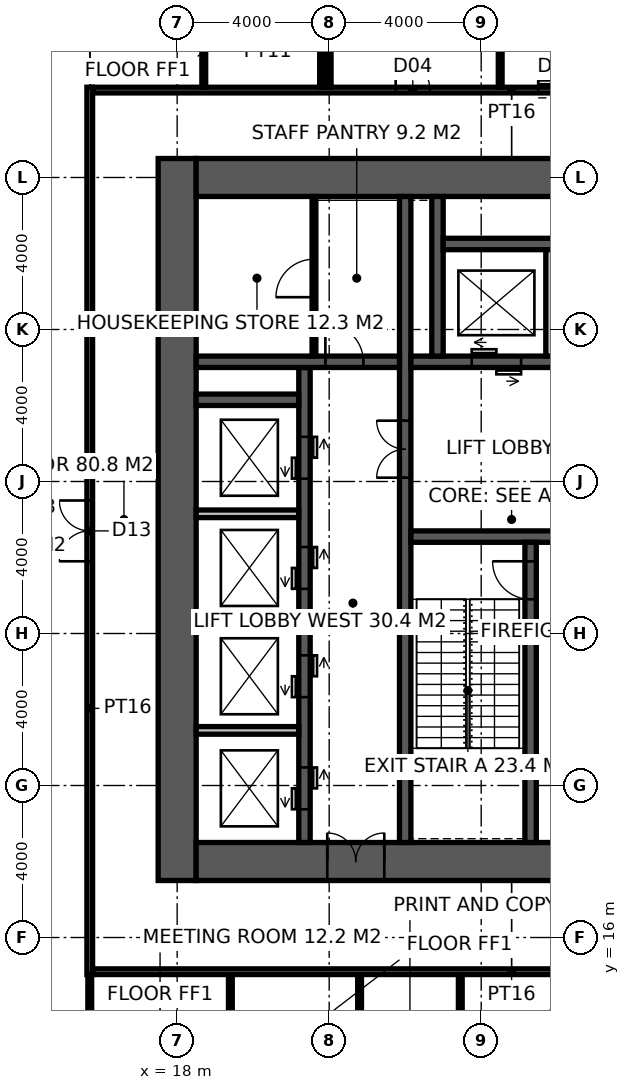
"""IFC4 building model, lengths in metres.
Left out: names, types, materials, properties, quantities, classifications, styles, units other than length and angle.
Written with IfcOpenShell. Run it as: python <this file> out.ifc"""

import sys

from ifc_helpers import new_model, si_unit, direction, frame, frame_2d, origin, place, context, subcontext, project, spatial, rectangle, extrude, element, fill, save


model = new_model("IFC4")
c1 = context("Model", 3, precision=1e-05, world=origin(), true_north=direction((0.0, 1.0)))
c2 = subcontext(c1, "Body", "Model", "MODEL_VIEW")
j1 = project(units=[si_unit("LENGTHUNIT", "METRE"), si_unit("PLANEANGLEUNIT", "RADIAN")], contexts=[c1])
p1 = place(None, origin())
s1 = spatial("IfcSite", under=j1, at=p1, CompositionType="ELEMENT")
p2 = place(p1, origin())
s2 = spatial("IfcBuilding", under=s1, at=p2, CompositionType="ELEMENT")
p3 = place(p2, frame((0.0, 0.0, 209.2)))
s3 = spatial("IfcBuildingStorey", under=s2, at=p3, CompositionType="ELEMENT", Elevation=209.2)
p4 = place(p3, frame((18.0, 17.5, -0.15), z_axis=(0.0, 0.0, 1.0), x_axis=(0.0, 1.0, 0.0)))
e1 = element("IfcWall", 1, at=p4, inside=s3, PredefinedType="SHEAR", context=c2, shape_type="SweptSolid", body=[
    extrude(rectangle(XDim=19.0, YDim=1.0, at=frame_2d((9.5, 0.0))), origin(), (0.0, 0.0, 1.0), 5.0),
])
p5 = place(p3, frame((18.5, 18.0, -0.15), z_axis=(0.0, 0.0, 1.0), x_axis=(1.0, 0.0, 0.0)))
e2 = element("IfcWall", 2, at=p5, inside=s3, PredefinedType="SHEAR", context=c2, shape_type="SweptSolid", body=[
    extrude(rectangle(XDim=17.6, YDim=1.0, at=frame_2d((8.8, 0.0))), origin(), (0.0, 0.0, 1.0), 5.0),
])
p6 = place(p5, frame((3.45, 0.0, 0.15)))
e3 = element("IfcOpeningElement", 3, at=p6, cuts=e2, PredefinedType="OPENING", context=c2, shape_type="SweptSolid", body=[
    extrude(rectangle(XDim=1.5, YDim=2.4, at=frame_2d((0.75, 1.2))), frame((0.0, 0.51, 0.0), z_axis=(0.0, -1.0, 0.0), x_axis=(1.0, 0.0, 0.0)), (0.0, 0.0, 1.0), 1.02),
])
p7 = place(p3, frame((18.5, 36.0, -0.15), z_axis=(0.0, 0.0, 1.0), x_axis=(1.0, 0.0, 0.0)))
e4 = element("IfcWall", 4, at=p7, inside=s3, PredefinedType="SHEAR", context=c2, shape_type="SweptSolid", body=[
    extrude(rectangle(XDim=17.6, YDim=1.0, at=frame_2d((8.8, 0.0))), origin(), (0.0, 0.0, 1.0), 5.0),
])
p8 = place(p3, frame((24.0, 18.5, -0.15), z_axis=(0.0, 0.0, 1.0), x_axis=(0.0, 1.0, 0.0)))
e5 = element("IfcWall", 5, at=p8, inside=s3, PredefinedType="SHEAR", context=c2, shape_type="SweptSolid", body=[
    extrude(rectangle(XDim=17.0, YDim=0.3, at=frame_2d((8.5, 0.0))), origin(), (0.0, 0.0, 1.0), 5.0),
])
p9 = place(p8, frame((9.6, 0.0, 0.15)))
e6 = element("IfcOpeningElement", 6, at=p9, cuts=e5, PredefinedType="OPENING", context=c2, shape_type="SweptSolid", body=[
    extrude(rectangle(XDim=1.5, YDim=2.4, at=frame_2d((0.75, 1.2))), frame((0.0, 0.16, 0.0), z_axis=(0.0, -1.0, 0.0), x_axis=(1.0, 0.0, 0.0)), (0.0, 0.0, 1.0), 0.32),
])
p10 = place(p3, frame((24.15, 26.55, -0.15), z_axis=(0.0, 0.0, 1.0), x_axis=(1.0, 0.0, 0.0)))
e7 = element("IfcWall", 7, at=p10, inside=s3, PredefinedType="SHEAR", context=c2, shape_type="SweptSolid", body=[
    extrude(rectangle(XDim=11.25, YDim=0.3, at=frame_2d((5.625, 0.0))), origin(), (0.0, 0.0, 1.0), 5.0),
])
p11 = place(p10, frame((9.25, 0.0, 0.15)))
e8 = element("IfcOpeningElement", 8, at=p11, cuts=e7, PredefinedType="OPENING", context=c2, shape_type="SweptSolid", body=[
    extrude(rectangle(XDim=1.0, YDim=2.2, at=frame_2d((0.5, 1.1))), frame((0.0, 0.16, 0.0), z_axis=(0.0, -1.0, 0.0), x_axis=(1.0, 0.0, 0.0)), (0.0, 0.0, 1.0), 0.32),
])
p12 = place(p10, frame((4.9, 0.0, 0.15)))
e9 = element("IfcOpeningElement", 9, at=p12, cuts=e7, PredefinedType="OPENING", context=c2, shape_type="SweptSolid", body=[
    extrude(rectangle(XDim=1.5, YDim=2.4, at=frame_2d((0.75, 1.2))), frame((0.0, 0.16, 0.0), z_axis=(0.0, -1.0, 0.0), x_axis=(1.0, 0.0, 0.0)), (0.0, 0.0, 1.0), 0.32),
])
p13 = place(p3, frame((27.3, 18.5, -0.15), z_axis=(0.0, 0.0, 1.0), x_axis=(0.0, 1.0, 0.0)))
e10 = element("IfcWall", 10, at=p13, inside=s3, PredefinedType="SHEAR", context=c2, shape_type="SweptSolid", body=[
    extrude(rectangle(XDim=7.9, YDim=0.3, at=frame_2d((3.95, 0.0))), origin(), (0.0, 0.0, 1.0), 5.0),
])
p14 = place(p13, frame((6.4, 0.0, 0.15)))
e11 = element("IfcOpeningElement", 11, at=p14, cuts=e10, PredefinedType="OPENING", context=c2, shape_type="SweptSolid", body=[
    extrude(rectangle(XDim=1.0, YDim=2.2, at=frame_2d((0.5, 1.1))), frame((0.0, 0.16, 0.0), z_axis=(0.0, -1.0, 0.0), x_axis=(1.0, 0.0, 0.0)), (0.0, 0.0, 1.0), 0.32),
])
p15 = place(p3, frame((24.15, 31.15, -0.15), z_axis=(0.0, 0.0, 1.0), x_axis=(1.0, 0.0, 0.0)))
e12 = element("IfcWall", 12, at=p15, inside=s3, PredefinedType="SHEAR", context=c2, shape_type="SweptSolid", body=[
    extrude(rectangle(XDim=11.25, YDim=0.3, at=frame_2d((5.625, 0.0))), origin(), (0.0, 0.0, 1.0), 5.0),
])
p16 = place(p15, frame((1.6, 0.0, 0.15)))
e13 = element("IfcOpeningElement", 13, at=p16, cuts=e12, PredefinedType="OPENING", context=c2, shape_type="SweptSolid", body=[
    extrude(rectangle(XDim=1.3, YDim=2.4, at=frame_2d((0.65, 1.2))), frame((0.0, 0.16, 0.0), z_axis=(0.0, -1.0, 0.0), x_axis=(1.0, 0.0, 0.0)), (0.0, 0.0, 1.0), 0.32),
])
p17 = place(p15, frame((4.4, 0.0, 0.15)))
e14 = element("IfcOpeningElement", 14, at=p17, cuts=e12, PredefinedType="OPENING", context=c2, shape_type="SweptSolid", body=[
    extrude(rectangle(XDim=1.3, YDim=2.4, at=frame_2d((0.65, 1.2))), frame((0.0, 0.16, 0.0), z_axis=(0.0, -1.0, 0.0), x_axis=(1.0, 0.0, 0.0)), (0.0, 0.0, 1.0), 0.32),
])
p18 = place(p15, frame((7.25, 0.0, 0.15)))
e15 = element("IfcOpeningElement", 15, at=p18, cuts=e12, PredefinedType="OPENING", context=c2, shape_type="SweptSolid", body=[
    extrude(rectangle(XDim=1.4, YDim=2.4, at=frame_2d((0.7, 1.2))), frame((0.0, 0.16, 0.0), z_axis=(0.0, -1.0, 0.0), x_axis=(1.0, 0.0, 0.0)), (0.0, 0.0, 1.0), 0.32),
])
p19 = place(p3, frame((21.35, 18.5, -0.15), z_axis=(0.0, 0.0, 1.0), x_axis=(0.0, 1.0, 0.0)))
e16 = element("IfcWall", 16, at=p19, inside=s3, PredefinedType="SHEAR", context=c2, shape_type="SweptSolid", body=[
    extrude(rectangle(XDim=12.5, YDim=0.3, at=frame_2d((6.25, 0.0))), origin(), (0.0, 0.0, 1.0), 5.0),
])
p20 = place(p19, frame((0.875, 0.0, 0.15)))
e17 = element("IfcOpeningElement", 17, at=p20, cuts=e16, PredefinedType="OPENING", context=c2, shape_type="SweptSolid", body=[
    extrude(rectangle(XDim=1.1, YDim=2.2, at=frame_2d((0.55, 1.1))), frame((0.0, 0.16, 0.0), z_axis=(0.0, -1.0, 0.0), x_axis=(1.0, 0.0, 0.0)), (0.0, 0.0, 1.0), 0.32),
])
p21 = place(p19, frame((3.825, 0.0, 0.15)))
e18 = element("IfcOpeningElement", 18, at=p21, cuts=e16, PredefinedType="OPENING", context=c2, shape_type="SweptSolid", body=[
    extrude(rectangle(XDim=1.1, YDim=2.2, at=frame_2d((0.55, 1.1))), frame((0.0, 0.16, 0.0), z_axis=(0.0, -1.0, 0.0), x_axis=(1.0, 0.0, 0.0)), (0.0, 0.0, 1.0), 0.32),
])
p22 = place(p19, frame((6.675, 0.0, 0.15)))
e19 = element("IfcOpeningElement", 19, at=p22, cuts=e16, PredefinedType="OPENING", context=c2, shape_type="SweptSolid", body=[
    extrude(rectangle(XDim=1.1, YDim=2.2, at=frame_2d((0.55, 1.1))), frame((0.0, 0.16, 0.0), z_axis=(0.0, -1.0, 0.0), x_axis=(1.0, 0.0, 0.0)), (0.0, 0.0, 1.0), 0.32),
])
p23 = place(p19, frame((9.575, 0.0, 0.15)))
e20 = element("IfcOpeningElement", 20, at=p23, cuts=e16, PredefinedType="OPENING", context=c2, shape_type="SweptSolid", body=[
    extrude(rectangle(XDim=1.1, YDim=2.2, at=frame_2d((0.55, 1.1))), frame((0.0, 0.16, 0.0), z_axis=(0.0, -1.0, 0.0), x_axis=(1.0, 0.0, 0.0)), (0.0, 0.0, 1.0), 0.32),
])
p24 = place(p3, frame((18.5, 31.15, -0.15), z_axis=(0.0, 0.0, 1.0), x_axis=(1.0, 0.0, 0.0)))
e21 = element("IfcWall", 21, at=p24, inside=s3, PredefinedType="SHEAR", context=c2, shape_type="SweptSolid", body=[
    extrude(rectangle(XDim=5.35, YDim=0.3, at=frame_2d((2.675, 0.0))), origin(), (0.0, 0.0, 1.0), 5.0),
])
p25 = place(p24, frame((3.4, 0.0, 0.15)))
e22 = element("IfcOpeningElement", 22, at=p25, cuts=e21, PredefinedType="OPENING", context=c2, shape_type="SweptSolid", body=[
    extrude(rectangle(XDim=1.0, YDim=2.2, at=frame_2d((0.5, 1.1))), frame((0.0, 0.16, 0.0), z_axis=(0.0, -1.0, 0.0), x_axis=(1.0, 0.0, 0.0)), (0.0, 0.0, 1.0), 0.32),
])
p26 = place(p3, frame((18.5, 30.15, -0.15), z_axis=(0.0, 0.0, 1.0), x_axis=(1.0, 0.0, 0.0)))
e23 = element("IfcWall", 23, at=p26, inside=s3, PredefinedType="SHEAR", context=c2, shape_type="SweptSolid", body=[
    extrude(rectangle(XDim=2.7, YDim=0.3, at=frame_2d((1.35, 0.0))), origin(), (0.0, 0.0, 1.0), 5.0),
])
p27 = place(p3, frame((24.85, 31.3, -0.15), z_axis=(0.0, 0.0, 1.0), x_axis=(0.0, 1.0, 0.0)))
e24 = element("IfcWall", 24, at=p27, inside=s3, PredefinedType="SHEAR", context=c2, shape_type="SweptSolid", body=[
    extrude(rectangle(XDim=4.2, YDim=0.3, at=frame_2d((2.1, 0.0))), origin(), (0.0, 0.0, 1.0), 5.0),
])
p28 = place(p3, frame((25.0, 34.25, -0.15), z_axis=(0.0, 0.0, 1.0), x_axis=(1.0, 0.0, 0.0)))
e25 = element("IfcWall", 25, at=p28, inside=s3, PredefinedType="SHEAR", context=c2, shape_type="SweptSolid", body=[
    extrude(rectangle(XDim=8.6, YDim=0.3, at=frame_2d((4.3, 0.0))), origin(), (0.0, 0.0, 1.0), 5.0),
])
p29 = place(p3, frame((27.8, 31.3, -0.15), z_axis=(0.0, 0.0, 1.0), x_axis=(0.0, 1.0, 0.0)))
e26 = element("IfcWall", 26, at=p29, inside=s3, PredefinedType="SOLIDWALL", context=c2, shape_type="SweptSolid", body=[
    extrude(rectangle(XDim=2.8, YDim=0.2, at=frame_2d((1.4, 0.0))), origin(), (0.0, 0.0, 1.0), 5.0),
])
for number, where, z_axis, x_axis in (
    (27, (18.5, 21.45, -0.15), (0.0, 0.0, 1.0), (1.0, 0.0, 0.0)),
    (28, (18.5, 24.3, -0.15), (0.0, 0.0, 1.0), (1.0, 0.0, 0.0)),
    (29, (18.5, 27.15, -0.15), (0.0, 0.0, 1.0), (1.0, 0.0, 0.0)),
):
    element("IfcWall", number, at=place(p3, frame(where, z_axis=z_axis, x_axis=x_axis)), inside=s3, PredefinedType="SOLIDWALL", context=c2, shape_type="SweptSolid", body=[
        extrude(rectangle(XDim=2.7, YDim=0.2, at=frame_2d((1.35, 0.0))), origin(), (0.0, 0.0, 1.0), 5.0),
    ])
p30 = place(p3, frame((21.6, 31.3, 0.0), z_axis=(0.0, 0.0, 1.0), x_axis=(0.0, 1.0, 0.0)))
e30 = element("IfcWall", 30, at=p30, inside=s3, PredefinedType="PARTITIONING", context=c2, shape_type="SweptSolid", body=[
    extrude(rectangle(XDim=4.2, YDim=0.1, at=frame_2d((2.1, 0.0))), origin(), (0.0, 0.0, 1.0), 4.85),
])
p31 = place(p30, frame((1.55, 0.0, 0.0)))
e31 = element("IfcOpeningElement", 31, at=p31, cuts=e30, PredefinedType="OPENING", context=c2, shape_type="SweptSolid", body=[
    extrude(rectangle(XDim=1.0, YDim=2.2, at=frame_2d((0.5, 1.1))), frame((0.0, 0.06, 0.0), z_axis=(0.0, -1.0, 0.0), x_axis=(1.0, 0.0, 0.0)), (0.0, 0.0, 1.0), 0.12),
])
p32 = place(p3, frame((15.7, 15.025, 0.0), z_axis=(0.0, 0.0, 1.0), x_axis=(0.0, 1.0, 0.0)))
e32 = element("IfcWall", 32, at=p32, inside=s3, PredefinedType="PARTITIONING", context=c2, shape_type="SweptSolid", body=[
    extrude(rectangle(XDim=23.35, YDim=0.15, at=frame_2d((11.675, 0.0))), origin(), (0.0, 0.0, 1.0), 4.85),
])
p33 = place(p32, frame((10.875, 0.0, 0.0)))
e33 = element("IfcOpeningElement", 33, at=p33, cuts=e32, PredefinedType="OPENING", context=c2, shape_type="SweptSolid", body=[
    extrude(rectangle(XDim=1.6, YDim=2.7, at=frame_2d((0.8, 1.35))), frame((0.0, 0.085, 0.0), z_axis=(0.0, -1.0, 0.0), x_axis=(1.0, 0.0, 0.0)), (0.0, 0.0, 1.0), 0.17),
])
p34 = place(p3, frame((15.775, 15.1, 0.0), z_axis=(0.0, 0.0, 1.0), x_axis=(1.0, 0.0, 0.0)))
e34 = element("IfcWall", 34, at=p34, inside=s3, PredefinedType="PARTITIONING", context=c2, shape_type="SweptSolid", body=[
    extrude(rectangle(XDim=22.05, YDim=0.15, at=frame_2d((11.025, 0.0))), origin(), (0.0, 0.0, 1.0), 4.85),
])
p35 = place(p3, frame((15.775, 38.3, 0.0), z_axis=(0.0, 0.0, 1.0), x_axis=(1.0, 0.0, 0.0)))
e35 = element("IfcWall", 35, at=p35, inside=s3, PredefinedType="PARTITIONING", context=c2, shape_type="SweptSolid", body=[
    extrude(rectangle(XDim=22.05, YDim=0.15, at=frame_2d((11.025, 0.0))), origin(), (0.0, 0.0, 1.0), 4.85),
])
p36 = place(p35, frame((7.975, 0.0, 0.0)))
e36 = element("IfcOpeningElement", 36, at=p36, cuts=e35, PredefinedType="OPENING", context=c2, shape_type="SweptSolid", body=[
    extrude(rectangle(XDim=0.9, YDim=2.1, at=frame_2d((0.45, 1.05))), frame((0.0, 0.085, 0.0), z_axis=(0.0, -1.0, 0.0), x_axis=(1.0, 0.0, 0.0)), (0.0, 0.0, 1.0), 0.17),
])
p37 = place(p35, frame((11.725, 0.0, 0.0)))
e37 = element("IfcOpeningElement", 37, at=p37, cuts=e35, PredefinedType="OPENING", context=c2, shape_type="SweptSolid", body=[
    extrude(rectangle(XDim=1.0, YDim=2.1, at=frame_2d((0.5, 1.05))), frame((0.0, 0.085, 0.0), z_axis=(0.0, -1.0, 0.0), x_axis=(1.0, 0.0, 0.0)), (0.0, 0.0, 1.0), 0.17),
])
p38 = place(p35, frame((15.575, 0.0, 0.0)))
e38 = element("IfcOpeningElement", 38, at=p38, cuts=e35, PredefinedType="OPENING", context=c2, shape_type="SweptSolid", body=[
    extrude(rectangle(XDim=0.9, YDim=2.1, at=frame_2d((0.45, 1.05))), frame((0.0, 0.085, 0.0), z_axis=(0.0, -1.0, 0.0), x_axis=(1.0, 0.0, 0.0)), (0.0, 0.0, 1.0), 0.17),
])
p39 = place(p3, frame((22.0, 38.375, 0.0), z_axis=(0.0, 0.0, 1.0), x_axis=(0.0, 1.0, 0.0)))
e39 = element("IfcWall", 39, at=p39, inside=s3, PredefinedType="PARTITIONING", context=c2, shape_type="SweptSolid", body=[
    extrude(rectangle(XDim=3.675, YDim=0.1, at=frame_2d((1.837, 0.0))), origin(), (0.0, 0.0, 1.0), 3.95),
])
p40 = place(p3, frame((26.5, 38.375, 0.0), z_axis=(0.0, 0.0, 1.0), x_axis=(0.0, 1.0, 0.0)))
e40 = element("IfcWall", 40, at=p40, inside=s3, PredefinedType="PARTITIONING", context=c2, shape_type="SweptSolid", body=[
    extrude(rectangle(XDim=3.575, YDim=0.1, at=frame_2d((1.788, 0.0))), origin(), (0.0, 0.0, 1.0), 4.85),
])
p41 = place(p3, frame((15.7, 11.55, 0.0), z_axis=(0.0, 0.0, 1.0), x_axis=(0.0, 1.0, 0.0)))
e41 = element("IfcWall", 41, at=p41, inside=s3, PredefinedType="PARTITIONING", context=c2, shape_type="SweptSolid", body=[
    extrude(rectangle(XDim=3.475, YDim=0.1, at=frame_2d((1.737, 0.0))), origin(), (0.0, 0.0, 1.0), 4.85),
])
p42 = place(p3, frame((18.7, 38.375, 0.0), z_axis=(0.0, 0.0, 1.0), x_axis=(0.0, 1.0, 0.0)))
e42 = element("IfcWall", 42, at=p42, inside=s3, PredefinedType="PARTITIONING", context=c2, shape_type="SweptSolid", body=[
    extrude(rectangle(XDim=4.675, YDim=0.1, at=frame_2d((2.337, 0.0))), origin(), (0.0, 0.0, 1.0), 4.85),
])
p43 = place(p3, frame((19.4, 11.55, 0.0), z_axis=(0.0, 0.0, 1.0), x_axis=(0.0, 1.0, 0.0)))
e43 = element("IfcWall", 43, at=p43, inside=s3, PredefinedType="PARTITIONING", context=c2, shape_type="SweptSolid", body=[
    extrude(rectangle(XDim=3.475, YDim=0.1, at=frame_2d((1.737, 0.0))), origin(), (0.0, 0.0, 1.0), 4.85),
])
p44 = place(p3, frame((21.8, 38.375, 0.0), z_axis=(0.0, 0.0, 1.0), x_axis=(0.0, 1.0, 0.0)))
e44 = element("IfcWall", 44, at=p44, inside=s3, PredefinedType="PARTITIONING", context=c2, shape_type="SweptSolid", body=[
    extrude(rectangle(XDim=4.675, YDim=0.1, at=frame_2d((2.337, 0.0))), origin(), (0.0, 0.0, 1.0), 3.95),
])
for number, where, z_axis, x_axis in (
    (45, (22.8, 11.55, 0.0), (0.0, 0.0, 1.0), (0.0, 1.0, 0.0)),
    (46, (25.45, 11.55, 0.0), (0.0, 0.0, 1.0), (0.0, 1.0, 0.0)),
):
    element("IfcWall", number, at=place(p3, frame(where, z_axis=z_axis, x_axis=x_axis)), inside=s3, PredefinedType="PARTITIONING", context=c2, shape_type="SweptSolid", body=[
        extrude(rectangle(XDim=3.475, YDim=0.1, at=frame_2d((1.737, 0.0))), origin(), (0.0, 0.0, 1.0), 4.85),
    ])
p45 = place(p14, origin())
e47 = element("IfcDoor", 47, at=p45, inside=s3, OperationType="SINGLE_SWING_RIGHT", PredefinedType="DOOR", context=c2, shape_type="SweptSolid", body=[
    extrude(rectangle(XDim=1.0, YDim=2.2, at=frame_2d((0.5, 1.1))), frame((0.0, 0.025, 0.0), z_axis=(0.0, -1.0, 0.0), x_axis=(1.0, 0.0, 0.0)), (0.0, 0.0, 1.0), 0.05),
])
fill(e11, e47)
p46 = place(p9, origin())
e48 = element("IfcDoor", 48, at=p46, inside=s3, OperationType="DOUBLE_DOOR_DOUBLE_SWING", PredefinedType="DOOR", context=c2, shape_type="SweptSolid", body=[
    extrude(rectangle(XDim=1.5, YDim=2.4, at=frame_2d((0.75, 1.2))), frame((0.0, 0.025, 0.0), z_axis=(0.0, -1.0, 0.0), x_axis=(1.0, 0.0, 0.0)), (0.0, 0.0, 1.0), 0.05),
])
fill(e6, e48)
p47 = place(p25, origin())
e49 = element("IfcDoor", 49, at=p47, inside=s3, OperationType="SINGLE_SWING_LEFT", PredefinedType="DOOR", context=c2, shape_type="SweptSolid", body=[
    extrude(rectangle(XDim=1.0, YDim=2.2, at=frame_2d((0.5, 1.1))), frame((0.0, 0.025, 0.0), z_axis=(0.0, -1.0, 0.0), x_axis=(1.0, 0.0, 0.0)), (0.0, 0.0, 1.0), 0.05),
])
fill(e22, e49)
p48 = place(p31, origin())
e50 = element("IfcDoor", 50, at=p48, inside=s3, OperationType="SINGLE_SWING_LEFT", PredefinedType="DOOR", context=c2, shape_type="SweptSolid", body=[
    extrude(rectangle(XDim=1.0, YDim=2.2, at=frame_2d((0.5, 1.1))), frame((0.0, 0.025, 0.0), z_axis=(0.0, -1.0, 0.0), x_axis=(1.0, 0.0, 0.0)), (0.0, 0.0, 1.0), 0.05),
])
fill(e31, e50)
p49 = place(p6, origin())
e51 = element("IfcDoor", 51, at=p49, inside=s3, OperationType="DOUBLE_DOOR_DOUBLE_SWING", PredefinedType="DOOR", context=c2, shape_type="SweptSolid", body=[
    extrude(rectangle(XDim=1.5, YDim=2.4, at=frame_2d((0.75, 1.2))), frame((0.0, 0.025, 0.0), z_axis=(0.0, -1.0, 0.0), x_axis=(1.0, 0.0, 0.0)), (0.0, 0.0, 1.0), 0.05),
])
fill(e3, e51)
p50 = place(p36, origin())
e52 = element("IfcDoor", 52, at=p50, inside=s3, OperationType="SINGLE_SWING_LEFT", PredefinedType="DOOR", context=c2, shape_type="SweptSolid", body=[
    extrude(rectangle(XDim=0.9, YDim=2.1, at=frame_2d((0.45, 1.05))), frame((0.0, 0.025, 0.0), z_axis=(0.0, -1.0, 0.0), x_axis=(1.0, 0.0, 0.0)), (0.0, 0.0, 1.0), 0.05),
])
fill(e36, e52)
p51 = place(p37, origin())
e53 = element("IfcDoor", 53, at=p51, inside=s3, OperationType="SLIDING_TO_LEFT", PredefinedType="DOOR", context=c2, shape_type="SweptSolid", body=[
    extrude(rectangle(XDim=1.0, YDim=2.1, at=frame_2d((0.5, 1.05))), frame((0.0, 0.025, 0.0), z_axis=(0.0, -1.0, 0.0), x_axis=(1.0, 0.0, 0.0)), (0.0, 0.0, 1.0), 0.05),
])
fill(e37, e53)
p52 = place(p33, origin())
e54 = element("IfcDoor", 54, at=p52, inside=s3, OperationType="DOUBLE_DOOR_DOUBLE_SWING", PredefinedType="DOOR", context=c2, shape_type="SweptSolid", body=[
    extrude(rectangle(XDim=1.6, YDim=2.7, at=frame_2d((0.8, 1.35))), frame((0.0, 0.025, 0.0), z_axis=(0.0, -1.0, 0.0), x_axis=(1.0, 0.0, 0.0)), (0.0, 0.0, 1.0), 0.05),
])
fill(e33, e54)
p53 = place(p16, origin())
e55 = element("IfcDoor", 55, at=p53, inside=s3, OperationType="DOUBLE_DOOR_SLIDING", PredefinedType="DOOR", context=c2, shape_type="SweptSolid", body=[
    extrude(rectangle(XDim=1.3, YDim=2.4, at=frame_2d((0.65, 1.2))), frame((0.0, 0.025, 0.0), z_axis=(0.0, -1.0, 0.0), x_axis=(1.0, 0.0, 0.0)), (0.0, 0.0, 1.0), 0.05),
])
fill(e13, e55)
p54 = place(p20, origin())
e56 = element("IfcDoor", 56, at=p54, inside=s3, OperationType="DOUBLE_DOOR_SLIDING", PredefinedType="DOOR", context=c2, shape_type="SweptSolid", body=[
    extrude(rectangle(XDim=1.1, YDim=2.2, at=frame_2d((0.55, 1.1))), frame((0.0, 0.025, 0.0), z_axis=(0.0, -1.0, 0.0), x_axis=(1.0, 0.0, 0.0)), (0.0, 0.0, 1.0), 0.05),
])
fill(e17, e56)
p55 = place(p21, origin())
e57 = element("IfcDoor", 57, at=p55, inside=s3, OperationType="DOUBLE_DOOR_SLIDING", PredefinedType="DOOR", context=c2, shape_type="SweptSolid", body=[
    extrude(rectangle(XDim=1.1, YDim=2.2, at=frame_2d((0.55, 1.1))), frame((0.0, 0.025, 0.0), z_axis=(0.0, -1.0, 0.0), x_axis=(1.0, 0.0, 0.0)), (0.0, 0.0, 1.0), 0.05),
])
fill(e18, e57)
p56 = place(p22, origin())
e58 = element("IfcDoor", 58, at=p56, inside=s3, OperationType="DOUBLE_DOOR_SLIDING", PredefinedType="DOOR", context=c2, shape_type="SweptSolid", body=[
    extrude(rectangle(XDim=1.1, YDim=2.2, at=frame_2d((0.55, 1.1))), frame((0.0, 0.025, 0.0), z_axis=(0.0, -1.0, 0.0), x_axis=(1.0, 0.0, 0.0)), (0.0, 0.0, 1.0), 0.05),
])
fill(e19, e58)
p57 = place(p23, origin())
e59 = element("IfcDoor", 59, at=p57, inside=s3, OperationType="DOUBLE_DOOR_SLIDING", PredefinedType="DOOR", context=c2, shape_type="SweptSolid", body=[
    extrude(rectangle(XDim=1.1, YDim=2.2, at=frame_2d((0.55, 1.1))), frame((0.0, 0.025, 0.0), z_axis=(0.0, -1.0, 0.0), x_axis=(1.0, 0.0, 0.0)), (0.0, 0.0, 1.0), 0.05),
])
fill(e20, e59)
save(model, sys.argv[1])
